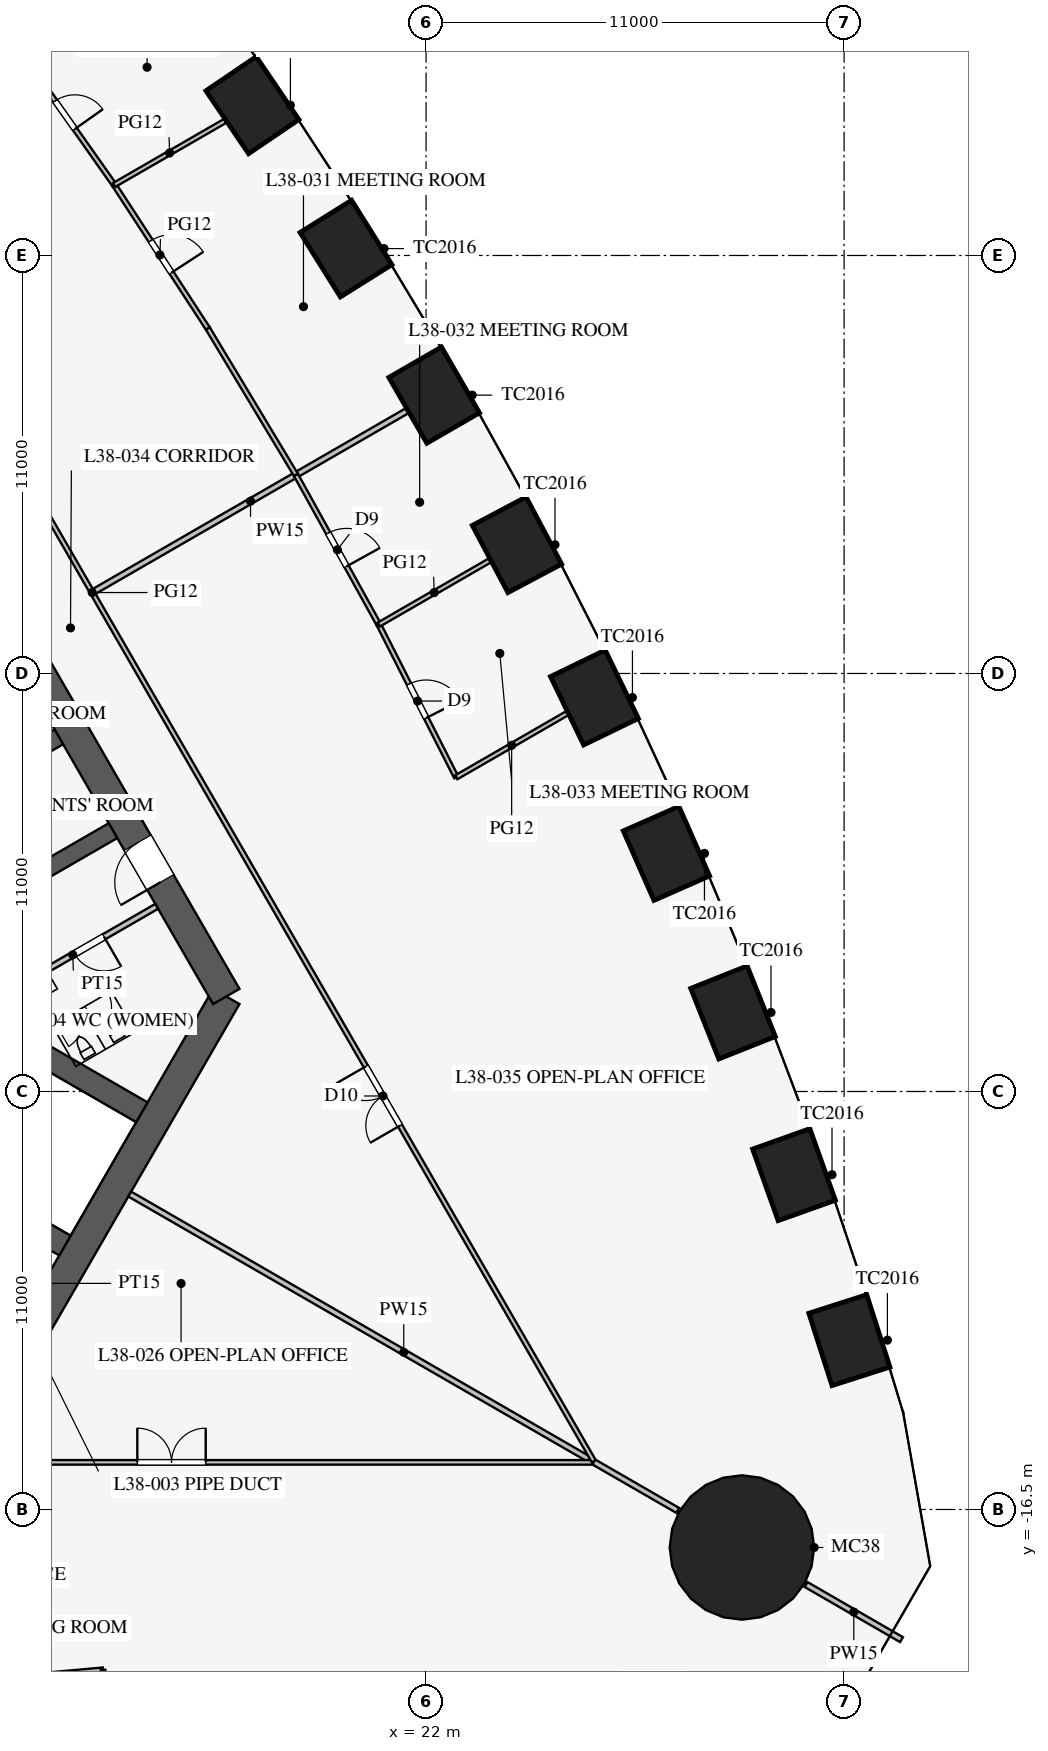
"""IFC4 building model, lengths in metres.
Left out: names, types, materials, properties, quantities, classifications, styles, units other than length and angle.
Written with IfcOpenShell. Run it as: python <this file> out.ifc"""

import sys

from ifc_helpers import new_model, si_unit, direction, frame, frame_2d, origin, origin_2d, place, context, subcontext, project, spatial, rectangle, circle, extrude, element, fill, save


model = new_model("IFC4")
c1 = context("Model", 3, precision=1e-05, world=origin(), true_north=direction((0.0, 1.0)))
c2 = subcontext(c1, "Body", "Model", "MODEL_VIEW")
j1 = project(units=[si_unit("LENGTHUNIT", "METRE"), si_unit("PLANEANGLEUNIT", "RADIAN")], contexts=[c1])
p1 = place(None, origin())
s1 = spatial("IfcSite", under=j1, at=p1, CompositionType="ELEMENT")
p2 = place(p1, origin())
s2 = spatial("IfcBuilding", under=s1, at=p2, CompositionType="ELEMENT")
p3 = place(p2, frame((0.0, 0.0, 166.1)))
s3 = spatial("IfcBuildingStorey", under=s2, at=p3, CompositionType="ELEMENT", Elevation=166.1)
for number, where, z_axis, x_axis in (
    (1, (33.139, -12.044, 0.0), (0.0, 0.0, 1.0), (-0.305, 0.952, 0.0)),
    (2, (31.682, -7.689, 0.0), (0.0, 0.0, 1.0), (-0.336, 0.942, 0.0)),
    (3, (30.077, -3.42, 0.0), (0.0, 0.0, 1.0), (-0.37, 0.929, 0.0)),
    (4, (28.325, 0.765, 0.0), (0.0, 0.0, 1.0), (-0.403, 0.915, 0.0)),
    (5, (26.43, 4.867, 0.0), (0.0, 0.0, 1.0), (-0.436, 0.9, 0.0)),
    (6, (24.393, 8.887, 0.0), (0.0, 0.0, 1.0), (-0.468, 0.883, 0.0)),
    (7, (22.213, 12.825, 0.0), (0.0, 0.0, 1.0), (-0.5, 0.866, 0.0)),
    (8, (19.893, 16.681, 0.0), (0.0, 0.0, 1.0), (-0.531, 0.847, 0.0)),
    (9, (17.43, 20.456, 0.0), (0.0, 0.0, 1.0), (-0.561, 0.828, 0.0)),
):
    element("IfcColumn", number, at=place(p3, frame(where, z_axis=z_axis, x_axis=x_axis)), inside=s3, PredefinedType="COLUMN", context=c2, shape_type="SweptSolid", body=[
        extrude(rectangle(XDim=2.0, YDim=1.6, at=origin_2d()), origin(), (0.0, 0.0, 1.0), 4.2),
    ])
p4 = place(p3, frame((30.311, -17.5, 0.0), z_axis=(0.0, 0.0, 1.0), x_axis=(1.0, 0.0, 0.0)))
e10 = element("IfcColumn", 10, at=p4, inside=s3, PredefinedType="COLUMN", context=c2, shape_type="SweptSolid", body=[
    extrude(circle(Radius=1.9, at=origin_2d()), origin(), (0.0, 0.0, 1.0), 4.2),
])
p5 = place(p3, frame((10.97, -13.0, 0.0), z_axis=(0.0, 0.0, 1.0), x_axis=(0.499995765644, 0.866027848477, 0.0)))
e11 = element("IfcWall", 11, at=p5, inside=s3, PredefinedType="SHEAR", context=c2, shape_type="SweptSolid", body=[
    extrude(rectangle(XDim=11.547, YDim=0.8, at=frame_2d((5.773, 0.0))), origin(), (0.0, 0.0, 1.0), 4.2),
])
p6 = place(p3, frame((16.743, -3.0, 0.0), z_axis=(0.0, 0.0, 1.0), x_axis=(-0.500002442456, 0.866023993627, 0.0)))
e12 = element("IfcWall", 12, at=p6, inside=s3, PredefinedType="SHEAR", context=c2, shape_type="SweptSolid", body=[
    extrude(rectangle(XDim=21.939, YDim=0.8, at=frame_2d((10.97, 0.0))), origin(), (0.0, 0.0, 1.0), 4.2),
])
p7 = place(p6, frame((17.27, 0.0, 0.0)))
e13 = element("IfcOpeningElement", 13, at=p7, cuts=e12, PredefinedType="OPENING", context=c2, shape_type="SweptSolid", body=[
    extrude(rectangle(XDim=1.2, YDim=2.1, at=frame_2d((0.6, 1.05))), frame((0.0, 0.41, 0.0), z_axis=(0.0, -1.0, 0.0), x_axis=(1.0, 0.0, 0.0)), (0.0, 0.0, 1.0), 0.82),
])
p8 = place(p6, frame((3.47, 0.0, 0.0)))
e14 = element("IfcOpeningElement", 14, at=p8, cuts=e12, PredefinedType="OPENING", context=c2, shape_type="SweptSolid", body=[
    extrude(rectangle(XDim=1.2, YDim=2.1, at=frame_2d((0.6, 1.05))), frame((0.0, 0.41, 0.0), z_axis=(0.0, -1.0, 0.0), x_axis=(1.0, 0.0, 0.0)), (0.0, 0.0, 1.0), 0.82),
])
for number, where, z_axis, x_axis in (
    (15, (11.532, 0.076, 0.0), (0.0, 0.0, 1.0), (0.866, 0.5, 0.0)),
    (16, (10.107, 2.544, 0.0), (0.0, 0.0, 1.0), (0.866, 0.5, 0.0)),
):
    element("IfcWall", number, at=place(p3, frame(where, z_axis=z_axis, x_axis=x_axis)), inside=s3, PredefinedType="SHEAR", context=c2, shape_type="SweptSolid", body=[
        extrude(rectangle(XDim=2.575, YDim=0.45, at=frame_2d((1.288, 0.0))), origin(), (0.0, 0.0, 1.0), 4.2),
    ])
for number, where, z_axis, x_axis in (
    (17, (4.638, -5.016, 0.0), (0.0, 0.0, 1.0), (0.866, -0.5, 0.0)),
    (18, (6.663, -1.509, 0.0), (0.0, 0.0, 1.0), (0.866, -0.5, 0.0)),
):
    element("IfcWall", number, at=place(p3, frame(where, z_axis=z_axis, x_axis=x_axis)), inside=s3, PredefinedType="SHEAR", context=c2, shape_type="SweptSolid", body=[
        extrude(rectangle(XDim=9.075, YDim=0.6, at=frame_2d((4.538, 0.0))), origin(), (0.0, 0.0, 1.0), 4.2),
    ])
p9 = place(p3, frame((10.495, -3.178, 0.0), z_axis=(0.0, 0.0, 1.0), x_axis=(0.86602216432, 0.500005610874, 0.0)))
e19 = element("IfcWall", 19, at=p9, inside=s3, PredefinedType="PARTITIONING", context=c2, shape_type="SweptSolid", body=[
    extrude(rectangle(XDim=5.1, YDim=0.15, at=frame_2d((2.55, 0.0))), origin(), (0.0, 0.0, 1.0), 4.0),
])
p10 = place(p9, frame((2.6, 0.0, 0.0)))
e20 = element("IfcOpeningElement", 20, at=p10, cuts=e19, PredefinedType="OPENING", context=c2, shape_type="SweptSolid", body=[
    extrude(rectangle(XDim=0.9, YDim=2.1, at=frame_2d((0.45, 1.05))), frame((0.0, 0.085, 0.0), z_axis=(0.0, -1.0, 0.0), x_axis=(1.0, 0.0, 0.0)), (0.0, 0.0, 1.0), 0.17),
])
p11 = place(p3, frame((14.203, -8.2, 0.0), z_axis=(0.0, 0.0, 1.0), x_axis=(0.866024668836, -0.500001272966, 0.0)))
e21 = element("IfcWall", 21, at=p11, inside=s3, PredefinedType="PARTITIONING", context=c2, shape_type="SweptSolid", body=[
    extrude(rectangle(XDim=16.65, YDim=0.15, at=frame_2d((8.325, 0.0))), origin(), (0.0, 0.0, 1.0), 2.3),
])
p12 = place(p3, frame((32.0, -18.475, 0.0), z_axis=(0.0, 0.0, 1.0), x_axis=(0.866042548026, -0.499970304126, 0.0)))
e22 = element("IfcWall", 22, at=p12, inside=s3, PredefinedType="PARTITIONING", context=c2, shape_type="SweptSolid", body=[
    extrude(rectangle(XDim=2.899, YDim=0.15, at=frame_2d((1.45, 0.0))), origin(), (0.0, 0.0, 1.0), 2.3),
])
p13 = place(p3, frame((-26.398, -15.26, 0.0), z_axis=(0.0, 0.0, 1.0), x_axis=(1.0, 0.0, 0.0)))
e23 = element("IfcWall", 23, at=p13, inside=s3, PredefinedType="PARTITIONING", context=c2, shape_type="SweptSolid", body=[
    extrude(rectangle(XDim=52.796, YDim=0.12, at=frame_2d((26.398, 0.0))), origin(), (0.0, 0.0, 1.0), 2.9),
])
p14 = place(p13, frame((10.2, 0.0, 0.15)))
e24 = element("IfcOpeningElement", 24, at=p14, cuts=e23, PredefinedType="OPENING", context=c2, shape_type="SweptSolid", body=[
    extrude(rectangle(XDim=1.8, YDim=2.1, at=frame_2d((0.9, 1.05))), frame((0.0, 0.07, 0.0), z_axis=(0.0, -1.0, 0.0), x_axis=(1.0, 0.0, 0.0)), (0.0, 0.0, 1.0), 0.14),
])
p15 = place(p13, frame((40.8, 0.0, 0.15)))
e25 = element("IfcOpeningElement", 25, at=p15, cuts=e23, PredefinedType="OPENING", context=c2, shape_type="SweptSolid", body=[
    extrude(rectangle(XDim=1.8, YDim=2.1, at=frame_2d((0.9, 1.05))), frame((0.0, 0.07, 0.0), z_axis=(0.0, -1.0, 0.0), x_axis=(1.0, 0.0, 0.0)), (0.0, 0.0, 1.0), 0.14),
])
p16 = place(p3, frame((9.0, -21.125, 0.0), z_axis=(0.0, 0.0, 1.0), x_axis=(0.995930325215, 0.090126507295, 0.0)))
e26 = element("IfcWall", 26, at=p16, inside=s3, PredefinedType="PARTITIONING", context=c2, shape_type="SweptSolid", body=[
    extrude(rectangle(XDim=4.518, YDim=0.12, at=frame_2d((2.259, 0.0))), origin(), (0.0, 0.0, 1.0), 2.9),
])
p17 = place(p16, frame((1.75, 0.0, 0.15)))
e27 = element("IfcOpeningElement", 27, at=p17, cuts=e26, PredefinedType="OPENING", context=c2, shape_type="SweptSolid", body=[
    extrude(rectangle(XDim=1.0, YDim=2.1, at=frame_2d((0.5, 1.05))), frame((0.0, 0.07, 0.0), z_axis=(0.0, -1.0, 0.0), x_axis=(1.0, 0.0, 0.0)), (0.0, 0.0, 1.0), 0.14),
])
p18 = place(p3, frame((13.5, -20.718, 0.0), z_axis=(0.0, 0.0, 1.0), x_axis=(0.0, -1.0, 0.0)))
e28 = element("IfcWall", 28, at=p18, inside=s3, PredefinedType="PARTITIONING", context=c2, shape_type="SweptSolid", body=[
    extrude(rectangle(XDim=3.36, YDim=0.12, at=frame_2d((1.68, 0.0))), origin(), (0.0, 0.0, 1.0), 2.6),
])
p19 = place(p3, frame((13.268, 7.66, 0.0), z_axis=(0.0, 0.0, 1.0), x_axis=(0.866013963754, 0.500019814191, 0.0)))
e29 = element("IfcWall", 29, at=p19, inside=s3, PredefinedType="PARTITIONING", context=c2, shape_type="SweptSolid", body=[
    extrude(rectangle(XDim=9.5, YDim=0.15, at=frame_2d((4.75, 0.0))), origin(), (0.0, 0.0, 1.0), 2.8),
])
p20 = place(p3, frame((26.415, -15.231, 0.0), z_axis=(0.0, 0.0, 1.0), x_axis=(-0.50000091641, 0.866024874695, 0.0)))
e30 = element("IfcWall", 30, at=p20, inside=s3, PredefinedType="PARTITIONING", context=c2, shape_type="SweptSolid", body=[
    extrude(rectangle(XDim=52.796, YDim=0.12, at=frame_2d((26.398, 0.0))), origin(), (0.0, 0.0, 1.0), 2.9),
])
p21 = place(p20, frame((10.2, 0.0, 0.15)))
e31 = element("IfcOpeningElement", 31, at=p21, cuts=e30, PredefinedType="OPENING", context=c2, shape_type="SweptSolid", body=[
    extrude(rectangle(XDim=1.8, YDim=2.1, at=frame_2d((0.9, 1.05))), frame((0.0, 0.07, 0.0), z_axis=(0.0, -1.0, 0.0), x_axis=(1.0, 0.0, 0.0)), (0.0, 0.0, 1.0), 0.14),
])
p22 = place(p20, frame((40.8, 0.0, 0.15)))
e32 = element("IfcOpeningElement", 32, at=p22, cuts=e30, PredefinedType="OPENING", context=c2, shape_type="SweptSolid", body=[
    extrude(rectangle(XDim=1.8, YDim=2.1, at=frame_2d((0.9, 1.05))), frame((0.0, 0.07, 0.0), z_axis=(0.0, -1.0, 0.0), x_axis=(1.0, 0.0, 0.0)), (0.0, 0.0, 1.0), 0.14),
])
p23 = place(p3, frame((18.576, 10.725, 0.0), z_axis=(0.0, 0.0, 1.0), x_axis=(-0.515548366618, 0.856860479703, 0.0)))
e33 = element("IfcWall", 33, at=p23, inside=s3, PredefinedType="PARTITIONING", context=c2, shape_type="SweptSolid", body=[
    extrude(rectangle(XDim=4.501, YDim=0.12, at=frame_2d((2.25, 0.0))), origin(), (0.0, 0.0, 1.0), 2.9),
])
p24 = place(p3, frame((16.256, 14.581, 0.0), z_axis=(0.0, 0.0, 1.0), x_axis=(-0.546069464151, 0.837739900161, 0.0)))
e34 = element("IfcWall", 34, at=p24, inside=s3, PredefinedType="PARTITIONING", context=c2, shape_type="SweptSolid", body=[
    extrude(rectangle(XDim=4.507, YDim=0.12, at=frame_2d((2.253, 0.0))), origin(), (0.0, 0.0, 1.0), 2.9),
])
p25 = place(p24, frame((1.75, 0.0, 0.15)))
e35 = element("IfcOpeningElement", 35, at=p25, cuts=e34, PredefinedType="OPENING", context=c2, shape_type="SweptSolid", body=[
    extrude(rectangle(XDim=1.0, YDim=2.1, at=frame_2d((0.5, 1.05))), frame((0.0, 0.07, 0.0), z_axis=(0.0, -1.0, 0.0), x_axis=(1.0, 0.0, 0.0)), (0.0, 0.0, 1.0), 0.14),
])
p26 = place(p3, frame((13.795, 18.357, 0.0), z_axis=(0.0, 0.0, 1.0), x_axis=(-0.575987178736, 0.817458726745, 0.0)))
e36 = element("IfcWall", 36, at=p26, inside=s3, PredefinedType="PARTITIONING", context=c2, shape_type="SweptSolid", body=[
    extrude(rectangle(XDim=4.518, YDim=0.12, at=frame_2d((2.259, 0.0))), origin(), (0.0, 0.0, 1.0), 2.9),
])
p27 = place(p26, frame((1.8, 0.0, 0.15)))
e37 = element("IfcOpeningElement", 37, at=p27, cuts=e36, PredefinedType="OPENING", context=c2, shape_type="SweptSolid", body=[
    extrude(rectangle(XDim=0.9, YDim=2.1, at=frame_2d((0.45, 1.05))), frame((0.0, 0.07, 0.0), z_axis=(0.0, -1.0, 0.0), x_axis=(1.0, 0.0, 0.0)), (0.0, 0.0, 1.0), 0.14),
])
p28 = place(p3, frame((20.756, 6.787, 0.0), z_axis=(0.0, 0.0, 1.0), x_axis=(-0.484292898211, 0.874905931368, 0.0)))
e38 = element("IfcWall", 38, at=p28, inside=s3, PredefinedType="PARTITIONING", context=c2, shape_type="SweptSolid", body=[
    extrude(rectangle(XDim=4.501, YDim=0.12, at=frame_2d((2.25, 0.0))), origin(), (0.0, 0.0, 1.0), 2.9),
])
p29 = place(p28, frame((1.75, 0.0, 0.15)))
e39 = element("IfcOpeningElement", 39, at=p29, cuts=e38, PredefinedType="OPENING", context=c2, shape_type="SweptSolid", body=[
    extrude(rectangle(XDim=1.0, YDim=2.1, at=frame_2d((0.5, 1.05))), frame((0.0, 0.07, 0.0), z_axis=(0.0, -1.0, 0.0), x_axis=(1.0, 0.0, 0.0)), (0.0, 0.0, 1.0), 0.14),
])
p30 = place(p3, frame((22.795, 2.768, 0.0), z_axis=(0.0, 0.0, 1.0), x_axis=(-0.452471679136, 0.891778772779, 0.0)))
e40 = element("IfcWall", 40, at=p30, inside=s3, PredefinedType="PARTITIONING", context=c2, shape_type="SweptSolid", body=[
    extrude(rectangle(XDim=4.507, YDim=0.12, at=frame_2d((2.253, 0.0))), origin(), (0.0, 0.0, 1.0), 2.9),
])
p31 = place(p30, frame((1.75, 0.0, 0.15)))
e41 = element("IfcOpeningElement", 41, at=p31, cuts=e40, PredefinedType="OPENING", context=c2, shape_type="SweptSolid", body=[
    extrude(rectangle(XDim=1.0, YDim=2.1, at=frame_2d((0.5, 1.05))), frame((0.0, 0.07, 0.0), z_axis=(0.0, -1.0, 0.0), x_axis=(1.0, 0.0, 0.0)), (0.0, 0.0, 1.0), 0.14),
])
p32 = place(p3, frame((13.795, 18.357, 0.0), z_axis=(0.0, 0.0, 1.0), x_axis=(0.866024928363, 0.500000823453, 0.0)))
e42 = element("IfcWall", 42, at=p32, inside=s3, PredefinedType="PARTITIONING", context=c2, shape_type="SweptSolid", body=[
    extrude(rectangle(XDim=3.366, YDim=0.12, at=frame_2d((1.683, 0.0))), origin(), (0.0, 0.0, 1.0), 2.9),
])
p33 = place(p3, frame((20.756, 6.787, 0.0), z_axis=(0.0, 0.0, 1.0), x_axis=(0.866022675988, 0.500004724652, 0.0)))
e43 = element("IfcWall", 43, at=p33, inside=s3, PredefinedType="PARTITIONING", context=c2, shape_type="SweptSolid", body=[
    extrude(rectangle(XDim=3.369, YDim=0.12, at=frame_2d((1.685, 0.0))), origin(), (0.0, 0.0, 1.0), 2.8),
])
p34 = place(p3, frame((22.795, 2.768, 0.0), z_axis=(0.0, 0.0, 1.0), x_axis=(0.866024928363, 0.500000823453, 0.0)))
e44 = element("IfcWall", 44, at=p34, inside=s3, PredefinedType="PARTITIONING", context=c2, shape_type="SweptSolid", body=[
    extrude(rectangle(XDim=3.366, YDim=0.12, at=frame_2d((1.683, 0.0))), origin(), (0.0, 0.0, 1.0), 2.9),
])
p35 = place(p10, frame((0.9, 0.0, 0.0), z_axis=(0.0, 0.0, 1.0), x_axis=(-1.0, 0.0, 0.0)))
e45 = element("IfcDoor", 45, at=p35, inside=s3, OperationType="SINGLE_SWING_LEFT", PredefinedType="DOOR", context=c2, shape_type="SweptSolid", body=[
    extrude(rectangle(XDim=0.9, YDim=2.1, at=frame_2d((0.45, 1.05))), frame((0.0, 0.025, 0.0), z_axis=(0.0, -1.0, 0.0), x_axis=(1.0, 0.0, 0.0)), (0.0, 0.0, 1.0), 0.05),
])
fill(e20, e45)
p36 = place(p8, origin())
e46 = element("IfcDoor", 46, at=p36, inside=s3, OperationType="SINGLE_SWING_LEFT", PredefinedType="DOOR", context=c2, shape_type="SweptSolid", body=[
    extrude(rectangle(XDim=1.2, YDim=2.1, at=frame_2d((0.6, 1.05))), frame((0.0, 0.025, 0.0), z_axis=(0.0, -1.0, 0.0), x_axis=(1.0, 0.0, 0.0)), (0.0, 0.0, 1.0), 0.05),
])
fill(e14, e46)
p37 = place(p15, origin())
e47 = element("IfcDoor", 47, at=p37, inside=s3, OperationType="DOUBLE_DOOR_SINGLE_SWING", PredefinedType="DOOR", context=c2, shape_type="SweptSolid", body=[
    extrude(rectangle(XDim=1.8, YDim=2.1, at=frame_2d((0.9, 1.05))), frame((0.0, 0.025, 0.0), z_axis=(0.0, -1.0, 0.0), x_axis=(1.0, 0.0, 0.0)), (0.0, 0.0, 1.0), 0.05),
])
fill(e25, e47)
p38 = place(p27, frame((0.9, 0.0, 0.0), z_axis=(0.0, 0.0, 1.0), x_axis=(-1.0, 0.0, 0.0)))
e48 = element("IfcDoor", 48, at=p38, inside=s3, OperationType="SINGLE_SWING_RIGHT", PredefinedType="DOOR", context=c2, shape_type="SweptSolid", body=[
    extrude(rectangle(XDim=0.9, YDim=2.1, at=frame_2d((0.45, 1.05))), frame((0.0, 0.025, 0.0), z_axis=(0.0, -1.0, 0.0), x_axis=(1.0, 0.0, 0.0)), (0.0, 0.0, 1.0), 0.05),
])
fill(e37, e48)
p39 = place(p25, frame((1.0, 0.0, 0.0), z_axis=(0.0, 0.0, 1.0), x_axis=(-1.0, 0.0, 0.0)))
e49 = element("IfcDoor", 49, at=p39, inside=s3, OperationType="SINGLE_SWING_RIGHT", PredefinedType="DOOR", context=c2, shape_type="SweptSolid", body=[
    extrude(rectangle(XDim=1.0, YDim=2.1, at=frame_2d((0.5, 1.05))), frame((0.0, 0.025, 0.0), z_axis=(0.0, -1.0, 0.0), x_axis=(1.0, 0.0, 0.0)), (0.0, 0.0, 1.0), 0.05),
])
fill(e35, e49)
p40 = place(p29, frame((1.0, 0.0, 0.0), z_axis=(0.0, 0.0, 1.0), x_axis=(-1.0, 0.0, 0.0)))
e50 = element("IfcDoor", 50, at=p40, inside=s3, OperationType="SINGLE_SWING_RIGHT", PredefinedType="DOOR", context=c2, shape_type="SweptSolid", body=[
    extrude(rectangle(XDim=1.0, YDim=2.1, at=frame_2d((0.5, 1.05))), frame((0.0, 0.025, 0.0), z_axis=(0.0, -1.0, 0.0), x_axis=(1.0, 0.0, 0.0)), (0.0, 0.0, 1.0), 0.05),
])
fill(e39, e50)
p41 = place(p31, frame((1.0, 0.0, 0.0), z_axis=(0.0, 0.0, 1.0), x_axis=(-1.0, 0.0, 0.0)))
e51 = element("IfcDoor", 51, at=p41, inside=s3, OperationType="SINGLE_SWING_RIGHT", PredefinedType="DOOR", context=c2, shape_type="SweptSolid", body=[
    extrude(rectangle(XDim=1.0, YDim=2.1, at=frame_2d((0.5, 1.05))), frame((0.0, 0.025, 0.0), z_axis=(0.0, -1.0, 0.0), x_axis=(1.0, 0.0, 0.0)), (0.0, 0.0, 1.0), 0.05),
])
fill(e41, e51)
p42 = place(p21, origin())
e52 = element("IfcDoor", 52, at=p42, inside=s3, OperationType="DOUBLE_DOOR_SINGLE_SWING", PredefinedType="DOOR", context=c2, shape_type="SweptSolid", body=[
    extrude(rectangle(XDim=1.8, YDim=2.1, at=frame_2d((0.9, 1.05))), frame((0.0, 0.025, 0.0), z_axis=(0.0, -1.0, 0.0), x_axis=(1.0, 0.0, 0.0)), (0.0, 0.0, 1.0), 0.05),
])
fill(e31, e52)
save(model, sys.argv[1])
